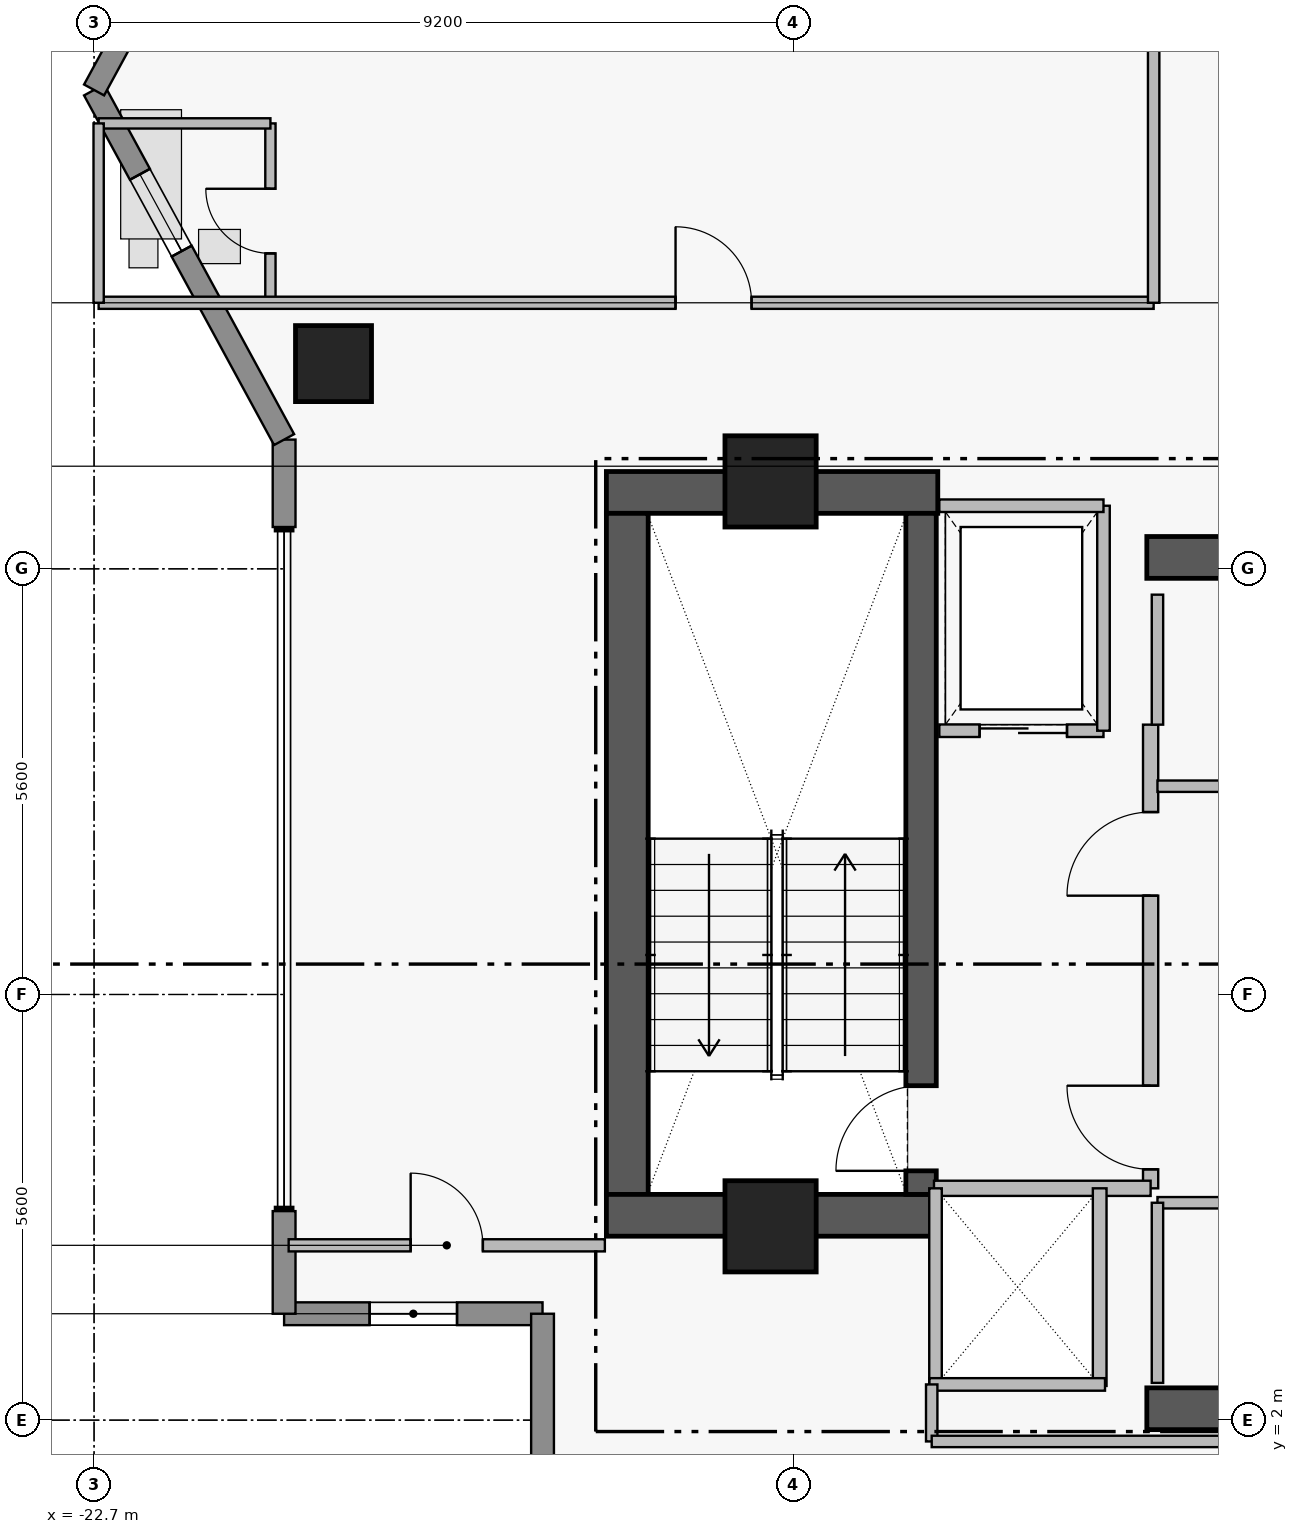
"""IFC4 building model, lengths in metres.
Left out: names, types, materials, properties, quantities, classifications, styles, units other than length and angle.
Written with IfcOpenShell. Run it as: python <this file> out.ifc"""

import sys

from ifc_helpers import new_model, si_unit, direction, frame, frame_2d, origin, origin_2d, place, context, subcontext, project, spatial, rectangle, extrude, element, fill, save


model = new_model("IFC4")
c1 = context("Model", 3, precision=1e-05, world=origin(), true_north=direction((0.0, 1.0)))
c2 = subcontext(c1, "Body", "Model", "MODEL_VIEW")
j1 = project(units=[si_unit("LENGTHUNIT", "METRE"), si_unit("PLANEANGLEUNIT", "RADIAN")], contexts=[c1])
p1 = place(None, origin())
s1 = spatial("IfcSite", under=j1, at=p1, CompositionType="ELEMENT")
p2 = place(p1, origin())
s2 = spatial("IfcBuilding", under=s1, at=p2, CompositionType="ELEMENT")
p3 = place(p2, frame((0.0, 0.0, 239.65)))
s3 = spatial("IfcBuildingStorey", under=s2, at=p3, CompositionType="ELEMENT", Elevation=239.65)
p4 = place(p3, frame((-15.96, 14.205, 0.0), z_axis=(0.0, 0.0, 1.0), x_axis=(1.0, 0.0, 0.0)))
e1 = element("IfcWall", 1, at=p4, inside=s3, PredefinedType="SHEAR", context=c2, shape_type="SweptSolid", body=[
    extrude(rectangle(XDim=4.36, YDim=0.55, at=frame_2d((2.18, 0.0))), origin(), (0.0, 0.0, 1.0), 3.51),
])
p5 = place(p3, frame((-15.685, 4.97, 0.0), z_axis=(0.0, 0.0, 1.0), x_axis=(0.0, 1.0, 0.0)))
e2 = element("IfcWall", 2, at=p5, inside=s3, PredefinedType="SHEAR", context=c2, shape_type="SweptSolid", body=[
    extrude(rectangle(XDim=8.96, YDim=0.55, at=frame_2d((4.48, 0.0))), origin(), (0.0, 0.0, 1.0), 3.51),
])
p6 = place(p3, frame((-15.96, 4.695, 0.0), z_axis=(0.0, 0.0, 1.0), x_axis=(1.0, 0.0, 0.0)))
e3 = element("IfcWall", 3, at=p6, inside=s3, PredefinedType="SHEAR", context=c2, shape_type="SweptSolid", body=[
    extrude(rectangle(XDim=4.36, YDim=0.55, at=frame_2d((2.18, 0.0))), origin(), (0.0, 0.0, 1.0), 3.51),
])
for number, where, z_axis, x_axis in (
    (4, (-8.85, 2.15, 0.0), (0.0, 0.0, 1.0), (1.0, 0.0, 0.0)),
    (5, (-8.85, 13.35, 0.0), (0.0, 0.0, 1.0), (1.0, 0.0, 0.0)),
):
    element("IfcWall", number, at=place(p3, frame(where, z_axis=z_axis, x_axis=x_axis)), inside=s3, PredefinedType="SHEAR", context=c2, shape_type="SweptSolid", body=[
        extrude(rectangle(XDim=7.6, YDim=0.55, at=frame_2d((3.8, 0.0))), origin(), (0.0, 0.0, 1.0), 3.48),
    ])
p7 = place(p3, frame((-11.82, 4.97, 0.0), z_axis=(0.0, 0.0, 1.0), x_axis=(0.0, 1.0, 0.0)))
e6 = element("IfcWall", 6, at=p7, inside=s3, PredefinedType="SHEAR", context=c2, shape_type="SweptSolid", body=[
    extrude(rectangle(XDim=8.96, YDim=0.4, at=frame_2d((4.48, 0.0))), origin(), (0.0, 0.0, 1.0), 3.51),
])
p8 = place(p7, frame((0.31, 0.0, 0.0)))
e7 = element("IfcOpeningElement", 7, at=p8, cuts=e6, PredefinedType="OPENING", context=c2, shape_type="SweptSolid", body=[
    extrude(rectangle(XDim=1.12, YDim=2.22, at=frame_2d((0.56, 1.11))), frame((0.0, 0.21, 0.0), z_axis=(0.0, -1.0, 0.0), x_axis=(1.0, 0.0, 0.0)), (0.0, 0.0, 1.0), 0.42),
])
for number, where, z_axis, x_axis in (
    (8, (-13.8, 14.35, 0.0), (0.0, 0.0, 1.0), (1.0, 0.0, 0.0)),
    (9, (-13.8, 4.55, 0.0), (0.0, 0.0, 1.0), (1.0, 0.0, 0.0)),
):
    element("IfcColumn", number, at=place(p3, frame(where, z_axis=z_axis, x_axis=x_axis)), inside=s3, PredefinedType="COLUMN", context=c2, shape_type="SweptSolid", body=[
        extrude(rectangle(XDim=1.2, YDim=1.2, at=origin_2d()), origin(), (0.0, 0.0, 1.0), 3.7),
    ])
p9 = place(p3, frame((-19.55, 15.9, 0.43), z_axis=(0.0, 0.0, 1.0), x_axis=(1.0, 0.0, 0.0)))
e10 = element("IfcColumn", 10, at=p9, inside=s3, PredefinedType="COLUMN", context=c2, shape_type="SweptSolid", body=[
    extrude(rectangle(XDim=1.0, YDim=1.0, at=origin_2d()), origin(), (0.0, 0.0, 1.0), 3.27),
])
p10 = place(p3, frame((-16.8, 3.4, 0.0), z_axis=(0.0, 0.0, 1.0), x_axis=(-1.0, 0.0, 0.0)))
e11 = element("IfcWall", 11, at=p10, inside=s3, PredefinedType="STANDARD", context=c2, shape_type="SweptSolid", body=[
    extrude(rectangle(XDim=3.4, YDim=0.3, at=frame_2d((1.7, 0.0))), origin(), (0.0, 0.0, 1.0), 3.48),
])
p11 = place(p10, frame((1.125, 0.0, 1.25)))
e12 = element("IfcOpeningElement", 12, at=p11, cuts=e11, PredefinedType="OPENING", context=c2, shape_type="SweptSolid", body=[
    extrude(rectangle(XDim=1.15, YDim=1.55, at=frame_2d((0.575, 0.775))), frame((0.0, 0.16, 0.0), z_axis=(0.0, -1.0, 0.0), x_axis=(1.0, 0.0, 0.0)), (0.0, 0.0, 1.0), 0.32),
])
p12 = place(p3, frame((-20.2, 3.4, 0.0), z_axis=(0.0, 0.0, 1.0), x_axis=(0.0, 1.0, 0.0)))
e13 = element("IfcWall", 13, at=p12, inside=s3, PredefinedType="STANDARD", context=c2, shape_type="SweptSolid", body=[
    extrude(rectangle(XDim=1.35, YDim=0.3, at=frame_2d((0.675, 0.0))), origin(), (0.0, 0.0, 1.0), 3.48),
])
p13 = place(p3, frame((-20.2, 13.75, 0.0), z_axis=(0.0, 0.0, 1.0), x_axis=(0.0, 1.0, 0.0)))
e14 = element("IfcWall", 14, at=p13, inside=s3, PredefinedType="STANDARD", context=c2, shape_type="SweptSolid", body=[
    extrude(rectangle(XDim=1.15, YDim=0.3, at=frame_2d((0.575, 0.0))), origin(), (0.0, 0.0, 1.0), 3.48),
])
p14 = place(p3, frame((-20.2, 14.9, 0.0), z_axis=(0.0, 0.0, 1.0), x_axis=(-0.477505494629, 0.878628762675, 0.0)))
e15 = element("IfcWall", 15, at=p14, inside=s3, PredefinedType="STANDARD", context=c2, shape_type="SweptSolid", body=[
    extrude(rectangle(XDim=5.236, YDim=0.3, at=frame_2d((2.618, 0.0))), origin(), (0.0, 0.0, 1.0), 3.48),
])
p15 = place(p14, frame((2.823, 0.0, 1.25)))
e16 = element("IfcOpeningElement", 16, at=p15, cuts=e15, PredefinedType="OPENING", context=c2, shape_type="SweptSolid", body=[
    extrude(rectangle(XDim=1.15, YDim=1.55, at=frame_2d((0.575, 0.775))), frame((0.0, 0.16, 0.0), z_axis=(0.0, -1.0, 0.0), x_axis=(1.0, 0.0, 0.0)), (0.0, 0.0, 1.0), 0.32),
])
p16 = place(p3, frame((-22.7, 19.5, 0.0), z_axis=(0.0, 0.0, 1.0), x_axis=(0.477505494629, 0.878628762675, 0.0)))
e17 = element("IfcWall", 17, at=p16, inside=s3, PredefinedType="STANDARD", context=c2, shape_type="SweptSolid", body=[
    extrude(rectangle(XDim=5.236, YDim=0.3, at=frame_2d((2.618, 0.0))), origin(), (0.0, 0.0, 1.0), 3.48),
])
p17 = place(p16, frame((1.679, 0.0, 1.25)))
e18 = element("IfcOpeningElement", 18, at=p17, cuts=e17, PredefinedType="OPENING", context=c2, shape_type="SweptSolid", body=[
    extrude(rectangle(XDim=1.15, YDim=1.55, at=frame_2d((0.575, 0.775))), frame((0.0, 0.16, 0.0), z_axis=(0.0, -1.0, 0.0), x_axis=(1.0, 0.0, 0.0)), (0.0, 0.0, 1.0), 0.32),
])
p18 = place(p3, frame((-16.8, 0.0, 0.0), z_axis=(0.0, 0.0, 1.0), x_axis=(0.0, 1.0, 0.0)))
e19 = element("IfcWall", 19, at=p18, inside=s3, PredefinedType="STANDARD", context=c2, shape_type="SweptSolid", body=[
    extrude(rectangle(XDim=3.4, YDim=0.3, at=frame_2d((1.7, 0.0))), origin(), (0.0, 0.0, 1.0), 3.48),
])
p19 = place(p18, frame((0.22, 0.0, 0.0)))
e20 = element("IfcOpeningElement", 20, at=p19, cuts=e19, PredefinedType="OPENING", context=c2, shape_type="SweptSolid", body=[
    extrude(rectangle(XDim=1.05, YDim=2.2, at=frame_2d((0.525, 1.1))), frame((0.0, 0.16, 0.0), z_axis=(0.0, -1.0, 0.0), x_axis=(1.0, 0.0, 0.0)), (0.0, 0.0, 1.0), 0.32),
])
p20 = place(p3, frame((-8.8, 5.05, 0.0), z_axis=(0.0, 0.0, 1.0), x_axis=(0.0, 1.0, 0.0)))
e21 = element("IfcWall", 21, at=p20, inside=s3, PredefinedType="PARTITIONING", context=c2, shape_type="SweptSolid", body=[
    extrude(rectangle(XDim=6.1, YDim=0.2, at=frame_2d((3.05, 0.0))), origin(), (0.0, 0.0, 1.0), 3.48),
])
p21 = place(p20, frame((0.25, 0.0, 0.0)))
e22 = element("IfcOpeningElement", 22, at=p21, cuts=e21, PredefinedType="OPENING", context=c2, shape_type="SweptSolid", body=[
    extrude(rectangle(XDim=1.1, YDim=2.2, at=frame_2d((0.55, 1.1))), frame((0.0, 0.11, 0.0), z_axis=(0.0, -1.0, 0.0), x_axis=(1.0, 0.0, 0.0)), (0.0, 0.0, 1.0), 0.22),
])
p22 = place(p20, frame((3.85, 0.0, 0.0)))
e23 = element("IfcOpeningElement", 23, at=p22, cuts=e21, PredefinedType="OPENING", context=c2, shape_type="SweptSolid", body=[
    extrude(rectangle(XDim=1.1, YDim=2.2, at=frame_2d((0.55, 1.1))), frame((0.0, 0.11, 0.0), z_axis=(0.0, -1.0, 0.0), x_axis=(1.0, 0.0, 0.0)), (0.0, 0.0, 1.0), 0.22),
])
p23 = place(p3, frame((-11.58, 11.07, 0.0), z_axis=(0.0, 0.0, 1.0), x_axis=(1.0, 0.0, 0.0)))
e24 = element("IfcWall", 24, at=p23, inside=s3, PredefinedType="PARTITIONING", context=c2, shape_type="SweptSolid", body=[
    extrude(rectangle(XDim=2.16, YDim=0.165, at=frame_2d((1.08, 0.0))), origin(), (0.0, 0.0, 1.0), 3.48),
])
p24 = place(p23, frame((0.53, 0.0, 0.0)))
e25 = element("IfcOpeningElement", 25, at=p24, cuts=e24, PredefinedType="OPENING", context=c2, shape_type="SweptSolid", body=[
    extrude(rectangle(XDim=1.15, YDim=2.25, at=frame_2d((0.575, 1.125))), frame((0.0, 0.093, 0.0), z_axis=(0.0, -1.0, 0.0), x_axis=(1.0, 0.0, 0.0)), (0.0, 0.0, 1.0), 0.185),
])
p25 = place(p3, frame((-8.71, 4.86, 0.0), z_axis=(0.0, 0.0, 1.0), x_axis=(1.0, 0.0, 0.0)))
e26 = element("IfcWall", 26, at=p25, inside=s3, PredefinedType="PARTITIONING", context=c2, shape_type="SweptSolid", body=[
    extrude(rectangle(XDim=4.22, YDim=0.15, at=frame_2d((2.11, 0.0))), origin(), (0.0, 0.0, 1.0), 3.48),
])
p26 = place(p25, frame((1.66, 0.0, 0.0)))
e27 = element("IfcOpeningElement", 27, at=p26, cuts=e26, PredefinedType="OPENING", context=c2, shape_type="SweptSolid", body=[
    extrude(rectangle(XDim=0.9, YDim=2.15, at=frame_2d((0.45, 1.075))), frame((0.0, 0.085, 0.0), z_axis=(0.0, -1.0, 0.0), x_axis=(1.0, 0.0, 0.0)), (0.0, 0.0, 1.0), 0.17),
])
p27 = place(p3, frame((-8.71, 10.34, 0.0), z_axis=(0.0, 0.0, 1.0), x_axis=(1.0, 0.0, 0.0)))
e28 = element("IfcWall", 28, at=p27, inside=s3, PredefinedType="PARTITIONING", context=c2, shape_type="SweptSolid", body=[
    extrude(rectangle(XDim=3.57, YDim=0.15, at=frame_2d((1.785, 0.0))), origin(), (0.0, 0.0, 1.0), 3.48),
])
p28 = place(p27, frame((1.335, 0.0, 0.0)))
e29 = element("IfcOpeningElement", 29, at=p28, cuts=e28, PredefinedType="OPENING", context=c2, shape_type="SweptSolid", body=[
    extrude(rectangle(XDim=0.9, YDim=2.15, at=frame_2d((0.45, 1.075))), frame((0.0, 0.085, 0.0), z_axis=(0.0, -1.0, 0.0), x_axis=(1.0, 0.0, 0.0)), (0.0, 0.0, 1.0), 0.17),
])
p29 = place(p3, frame((-20.14, 4.3, 0.0), z_axis=(0.0, 0.0, 1.0), x_axis=(1.0, 0.0, 0.0)))
e30 = element("IfcWall", 30, at=p29, inside=s3, PredefinedType="PARTITIONING", context=c2, shape_type="SweptSolid", body=[
    extrude(rectangle(XDim=4.16, YDim=0.16, at=frame_2d((2.08, 0.0))), origin(), (0.0, 0.0, 1.0), 3.48),
])
p30 = place(p29, frame((1.605, 0.0, 0.0)))
e31 = element("IfcOpeningElement", 31, at=p30, cuts=e30, PredefinedType="OPENING", context=c2, shape_type="SweptSolid", body=[
    extrude(rectangle(XDim=0.95, YDim=2.15, at=frame_2d((0.475, 1.075))), frame((0.0, 0.09, 0.0), z_axis=(0.0, -1.0, 0.0), x_axis=(1.0, 0.0, 0.0)), (0.0, 0.0, 1.0), 0.18),
])
p31 = place(p3, frame((-20.38, 16.7, 0.0), z_axis=(0.0, 0.0, 1.0), x_axis=(0.0, 1.0, 0.0)))
e32 = element("IfcWall", 32, at=p31, inside=s3, PredefinedType="PLUMBINGWALL", context=c2, shape_type="SweptSolid", body=[
    extrude(rectangle(XDim=2.36, YDim=0.135, at=frame_2d((1.18, 0.0))), origin(), (0.0, 0.0, 1.0), 3.48),
])
p32 = place(p31, frame((0.65, 0.0, 0.0)))
e33 = element("IfcOpeningElement", 33, at=p32, cuts=e32, PredefinedType="OPENING", context=c2, shape_type="SweptSolid", body=[
    extrude(rectangle(XDim=0.85, YDim=2.1, at=frame_2d((0.425, 1.05))), frame((0.0, 0.077, 0.0), z_axis=(0.0, -1.0, 0.0), x_axis=(1.0, 0.0, 0.0)), (0.0, 0.0, 1.0), 0.155),
])
p33 = place(p3, frame((-22.64, 16.7, 0.0), z_axis=(0.0, 0.0, 1.0), x_axis=(1.0, 0.0, 0.0)))
e34 = element("IfcWall", 34, at=p33, inside=s3, PredefinedType="PARTITIONING", context=c2, shape_type="SweptSolid", body=[
    extrude(rectangle(XDim=13.88, YDim=0.16, at=frame_2d((6.94, 0.0))), origin(), (0.0, 0.0, 1.0), 3.076),
])
p34 = place(p33, frame((7.59, 0.0, 0.0)))
e35 = element("IfcOpeningElement", 35, at=p34, cuts=e34, PredefinedType="OPENING", context=c2, shape_type="SweptSolid", body=[
    extrude(rectangle(XDim=1.0, YDim=2.15, at=frame_2d((0.5, 1.075))), frame((0.0, 0.09, 0.0), z_axis=(0.0, -1.0, 0.0), x_axis=(1.0, 0.0, 0.0)), (0.0, 0.0, 1.0), 0.18),
])
p35 = place(p3, frame((-11.65, 5.05, 0.0), z_axis=(0.0, 0.0, 1.0), x_axis=(1.0, 0.0, 0.0)))
e36 = element("IfcWall", 36, at=p35, inside=s3, PredefinedType="PARTITIONING", context=c2, shape_type="SweptSolid", body=[
    extrude(rectangle(XDim=2.85, YDim=0.2, at=frame_2d((1.425, 0.0))), origin(), (0.0, 0.0, 1.0), 3.48),
])
p36 = place(p3, frame((-9.42, 11.07, 0.0), z_axis=(0.0, 0.0, 1.0), x_axis=(0.0, 1.0, 0.0)))
e37 = element("IfcWall", 37, at=p36, inside=s3, PredefinedType="PARTITIONING", context=c2, shape_type="SweptSolid", body=[
    extrude(rectangle(XDim=2.96, YDim=0.165, at=frame_2d((1.48, 0.0))), origin(), (0.0, 0.0, 1.0), 3.48),
])
p37 = place(p3, frame((-11.58, 14.03, 0.0), z_axis=(0.0, 0.0, 1.0), x_axis=(1.0, 0.0, 0.0)))
e38 = element("IfcWall", 38, at=p37, inside=s3, PredefinedType="PARTITIONING", context=c2, shape_type="SweptSolid", body=[
    extrude(rectangle(XDim=2.16, YDim=0.165, at=frame_2d((1.08, 0.0))), origin(), (0.0, 0.0, 1.0), 3.48),
])
p38 = place(p3, frame((-8.71, 2.49, 0.0), z_axis=(0.0, 0.0, 1.0), x_axis=(0.0, 1.0, 0.0)))
e39 = element("IfcWall", 39, at=p38, inside=s3, PredefinedType="PARTITIONING", context=c2, shape_type="SweptSolid", body=[
    extrude(rectangle(XDim=2.37, YDim=0.15, at=frame_2d((1.185, 0.0))), origin(), (0.0, 0.0, 1.0), 3.48),
])
p39 = place(p3, frame((-8.71, 11.15, 0.0), z_axis=(0.0, 0.0, 1.0), x_axis=(0.0, 1.0, 0.0)))
e40 = element("IfcWall", 40, at=p39, inside=s3, PredefinedType="PARTITIONING", context=c2, shape_type="SweptSolid", body=[
    extrude(rectangle(XDim=1.71, YDim=0.15, at=frame_2d((0.855, 0.0))), origin(), (0.0, 0.0, 1.0), 3.48),
])
p40 = place(p3, frame((-9.47, 2.45, 0.0), z_axis=(0.0, 0.0, 1.0), x_axis=(0.0, 1.0, 0.0)))
e41 = element("IfcWall", 41, at=p40, inside=s3, PredefinedType="PARTITIONING", context=c2, shape_type="SweptSolid", body=[
    extrude(rectangle(XDim=2.6, YDim=0.18, at=frame_2d((1.3, 0.0))), origin(), (0.0, 0.0, 1.0), 3.48),
])
p41 = place(p3, frame((-11.63, 2.47, 0.0), z_axis=(0.0, 0.0, 1.0), x_axis=(0.0, 1.0, 0.0)))
e42 = element("IfcWall", 42, at=p41, inside=s3, PredefinedType="PARTITIONING", context=c2, shape_type="SweptSolid", body=[
    extrude(rectangle(XDim=2.58, YDim=0.165, at=frame_2d((1.29, 0.0))), origin(), (0.0, 0.0, 1.0), 3.48),
])
p42 = place(p3, frame((-11.71, 2.47, 0.0), z_axis=(0.0, 0.0, 1.0), x_axis=(1.0, 0.0, 0.0)))
e43 = element("IfcWall", 43, at=p42, inside=s3, PredefinedType="PARTITIONING", context=c2, shape_type="SweptSolid", body=[
    extrude(rectangle(XDim=2.31, YDim=0.165, at=frame_2d((1.155, 0.0))), origin(), (0.0, 0.0, 1.0), 2.38),
])
p43 = place(p3, frame((-11.68, 1.72, 0.0), z_axis=(0.0, 0.0, 1.0), x_axis=(0.0, 1.0, 0.0)))
e44 = element("IfcWall", 44, at=p43, inside=s3, PredefinedType="PARTITIONING", context=c2, shape_type="SweptSolid", body=[
    extrude(rectangle(XDim=0.75, YDim=0.15, at=frame_2d((0.375, 0.0))), origin(), (0.0, 0.0, 1.0), 3.48),
])
p44 = place(p3, frame((-11.68, 1.72, 0.0), z_axis=(0.0, 0.0, 1.0), x_axis=(1.0, 0.0, 0.0)))
e45 = element("IfcWall", 45, at=p44, inside=s3, PredefinedType="PARTITIONING", context=c2, shape_type="SweptSolid", body=[
    extrude(rectangle(XDim=11.68, YDim=0.15, at=frame_2d((5.84, 0.0))), origin(), (0.0, 0.0, 1.0), 2.38),
])
p45 = place(p3, frame((-22.64, 19.06, 0.0), z_axis=(0.0, 0.0, 1.0), x_axis=(1.0, 0.0, 0.0)))
e46 = element("IfcWall", 46, at=p45, inside=s3, PredefinedType="PLUMBINGWALL", context=c2, shape_type="SweptSolid", body=[
    extrude(rectangle(XDim=2.26, YDim=0.135, at=frame_2d((1.13, 0.0))), origin(), (0.0, 0.0, 1.0), 3.48),
])
p46 = place(p3, frame((-22.64, 16.7, 0.0), z_axis=(0.0, 0.0, 1.0), x_axis=(0.0, 1.0, 0.0)))
e47 = element("IfcWall", 47, at=p46, inside=s3, PredefinedType="PLUMBINGWALL", context=c2, shape_type="SweptSolid", body=[
    extrude(rectangle(XDim=2.36, YDim=0.135, at=frame_2d((1.18, 0.0))), origin(), (0.0, 0.0, 1.0), 3.48),
])
p47 = place(p3, frame((-8.76, 16.7, 0.0), z_axis=(0.0, 0.0, 1.0), x_axis=(0.0, 1.0, 0.0)))
e48 = element("IfcWall", 48, at=p47, inside=s3, PredefinedType="PARTITIONING", context=c2, shape_type="SweptSolid", body=[
    extrude(rectangle(XDim=6.95, YDim=0.15, at=frame_2d((3.475, 0.0))), origin(), (0.0, 0.0, 1.0), 3.48),
])
p48 = place(p11, origin())
e49 = element("IfcWindow", 49, at=p48, inside=s3, PartitioningType="SINGLE_PANEL", PredefinedType="WINDOW", context=c2, shape_type="SweptSolid", body=[
    extrude(rectangle(XDim=1.15, YDim=1.55, at=frame_2d((0.575, 0.775))), frame((0.0, 0.03, 0.0), z_axis=(0.0, -1.0, 0.0), x_axis=(1.0, 0.0, 0.0)), (0.0, 0.0, 1.0), 0.06),
])
fill(e12, e49)
p49 = place(p15, origin())
e50 = element("IfcWindow", 50, at=p49, inside=s3, PartitioningType="SINGLE_PANEL", PredefinedType="WINDOW", context=c2, shape_type="SweptSolid", body=[
    extrude(rectangle(XDim=1.15, YDim=1.55, at=frame_2d((0.575, 0.775))), frame((0.0, 0.03, 0.0), z_axis=(0.0, -1.0, 0.0), x_axis=(1.0, 0.0, 0.0)), (0.0, 0.0, 1.0), 0.06),
])
fill(e16, e50)
p50 = place(p8, origin())
e51 = element("IfcDoor", 51, at=p50, inside=s3, OperationType="SINGLE_SWING_LEFT", PredefinedType="DOOR", context=c2, shape_type="SweptSolid", body=[
    extrude(rectangle(XDim=1.12, YDim=2.22, at=frame_2d((0.56, 1.11))), frame((0.0, 0.025, 0.0), z_axis=(0.0, -1.0, 0.0), x_axis=(1.0, 0.0, 0.0)), (0.0, 0.0, 1.0), 0.05),
])
fill(e7, e51)
p51 = place(p21, origin())
e52 = element("IfcDoor", 52, at=p51, inside=s3, OperationType="SINGLE_SWING_RIGHT", PredefinedType="DOOR", context=c2, shape_type="SweptSolid", body=[
    extrude(rectangle(XDim=1.1, YDim=2.2, at=frame_2d((0.55, 1.1))), frame((0.0, 0.025, 0.0), z_axis=(0.0, -1.0, 0.0), x_axis=(1.0, 0.0, 0.0)), (0.0, 0.0, 1.0), 0.05),
])
fill(e22, e52)
p52 = place(p22, origin())
e53 = element("IfcDoor", 53, at=p52, inside=s3, OperationType="SINGLE_SWING_LEFT", PredefinedType="DOOR", context=c2, shape_type="SweptSolid", body=[
    extrude(rectangle(XDim=1.1, YDim=2.2, at=frame_2d((0.55, 1.1))), frame((0.0, 0.025, 0.0), z_axis=(0.0, -1.0, 0.0), x_axis=(1.0, 0.0, 0.0)), (0.0, 0.0, 1.0), 0.05),
])
fill(e23, e53)
p53 = place(p24, origin())
e54 = element("IfcDoor", 54, at=p53, inside=s3, OperationType="SLIDING_TO_LEFT", PredefinedType="DOOR", context=c2, shape_type="SweptSolid", body=[
    extrude(rectangle(XDim=1.15, YDim=2.25, at=frame_2d((0.575, 1.125))), frame((0.0, 0.025, 0.0), z_axis=(0.0, -1.0, 0.0), x_axis=(1.0, 0.0, 0.0)), (0.0, 0.0, 1.0), 0.05),
])
fill(e25, e54)
p54 = place(p30, origin())
e55 = element("IfcDoor", 55, at=p54, inside=s3, OperationType="SINGLE_SWING_LEFT", PredefinedType="DOOR", context=c2, shape_type="SweptSolid", body=[
    extrude(rectangle(XDim=0.95, YDim=2.15, at=frame_2d((0.475, 1.075))), frame((0.0, 0.025, 0.0), z_axis=(0.0, -1.0, 0.0), x_axis=(1.0, 0.0, 0.0)), (0.0, 0.0, 1.0), 0.05),
])
fill(e31, e55)
p55 = place(p32, origin())
e56 = element("IfcDoor", 56, at=p55, inside=s3, OperationType="SINGLE_SWING_RIGHT", PredefinedType="DOOR", context=c2, shape_type="SweptSolid", body=[
    extrude(rectangle(XDim=0.85, YDim=2.1, at=frame_2d((0.425, 1.05))), frame((0.0, 0.025, 0.0), z_axis=(0.0, -1.0, 0.0), x_axis=(1.0, 0.0, 0.0)), (0.0, 0.0, 1.0), 0.05),
])
fill(e33, e56)
p56 = place(p34, origin())
e57 = element("IfcDoor", 57, at=p56, inside=s3, OperationType="SINGLE_SWING_LEFT", PredefinedType="DOOR", context=c2, shape_type="SweptSolid", body=[
    extrude(rectangle(XDim=1.0, YDim=2.15, at=frame_2d((0.5, 1.075))), frame((0.0, 0.025, 0.0), z_axis=(0.0, -1.0, 0.0), x_axis=(1.0, 0.0, 0.0)), (0.0, 0.0, 1.0), 0.05),
])
fill(e35, e57)
save(model, sys.argv[1])
